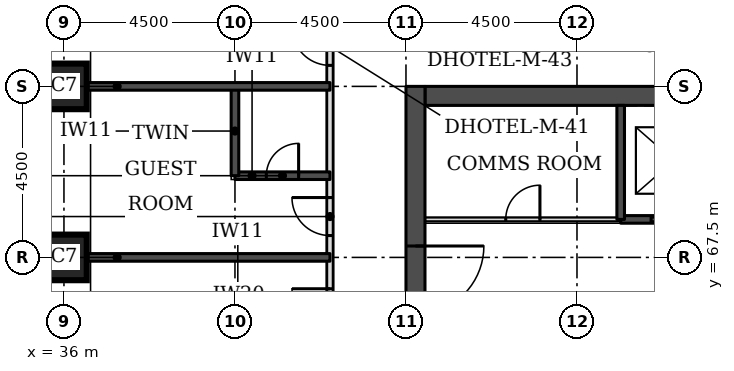
"""IFC4 building model, lengths in metres.
Left out: names, types, materials, properties, quantities, classifications, styles, units other than length and angle.
Written with IfcOpenShell. Run it as: python <this file> out.ifc"""

import sys

from ifc_helpers import new_model, si_unit, direction, frame, frame_2d, origin, origin_2d, place, context, subcontext, project, spatial, rectangle, extrude, element, fill, save


model = new_model("IFC4")
c1 = context("Model", 3, precision=1e-05, world=origin(), true_north=direction((0.0, 1.0)))
c2 = subcontext(c1, "Body", "Model", "MODEL_VIEW")
j1 = project(units=[si_unit("LENGTHUNIT", "METRE"), si_unit("PLANEANGLEUNIT", "RADIAN")], contexts=[c1])
p1 = place(None, origin())
s1 = spatial("IfcSite", under=j1, at=p1, CompositionType="ELEMENT")
p2 = place(p1, origin())
s2 = spatial("IfcBuilding", under=s1, at=p2, CompositionType="ELEMENT")
p3 = place(p2, frame((0.0, 0.0, 23.1)))
s3 = spatial("IfcBuildingStorey", under=s2, at=p3, CompositionType="ELEMENT", Elevation=23.1)
for number, where, z_axis, x_axis in (
    (1, (36.0, 67.5, 0.0), (0.0, 0.0, 1.0), (1.0, 0.0, 0.0)),
    (2, (36.0, 72.0, 0.0), (0.0, 0.0, 1.0), (1.0, 0.0, 0.0)),
):
    element("IfcColumn", number, at=place(p3, frame(where, z_axis=z_axis, x_axis=x_axis)), inside=s3, PredefinedType="COLUMN", context=c2, shape_type="SweptSolid", body=[
        extrude(rectangle(XDim=1.2, YDim=1.2, at=origin_2d()), origin(), (0.0, 0.0, 1.0), 3.3),
    ])
p4 = place(p3, frame((45.5, 71.75, 0.0), z_axis=(0.0, 0.0, 1.0), x_axis=(1.0, 0.0, 0.0)))
e3 = element("IfcWall", 3, at=p4, inside=s3, PredefinedType="SHEAR", context=c2, shape_type="SweptSolid", body=[
    extrude(rectangle(XDim=21.5, YDim=0.5, at=frame_2d((10.75, 0.0))), origin(), (0.0, 0.0, 1.0), 3.3),
])
p5 = place(p3, frame((45.25, 49.5, 0.0), z_axis=(0.0, 0.0, 1.0), x_axis=(0.0, 1.0, 0.0)))
e4 = element("IfcWall", 4, at=p5, inside=s3, PredefinedType="SHEAR", context=c2, shape_type="SweptSolid", body=[
    extrude(rectangle(XDim=22.5, YDim=0.5, at=frame_2d((11.25, 0.0))), origin(), (0.0, 0.0, 1.0), 3.3),
])
p6 = place(p5, frame((4.2, 0.0, 0.0)))
e5 = element("IfcOpeningElement", 5, at=p6, cuts=e4, PredefinedType="OPENING", context=c2, shape_type="SweptSolid", body=[
    extrude(rectangle(XDim=1.8, YDim=2.1, at=frame_2d((0.9, 1.05))), frame((0.0, 0.26, 0.0), z_axis=(0.0, -1.0, 0.0), x_axis=(1.0, 0.0, 0.0)), (0.0, 0.0, 1.0), 0.52),
])
p7 = place(p5, frame((6.9, 0.0, 0.0)))
e6 = element("IfcOpeningElement", 6, at=p7, cuts=e4, PredefinedType="OPENING", context=c2, shape_type="SweptSolid", body=[
    extrude(rectangle(XDim=1.1, YDim=2.1, at=frame_2d((0.55, 1.05))), frame((0.0, 0.26, 0.0), z_axis=(0.0, -1.0, 0.0), x_axis=(1.0, 0.0, 0.0)), (0.0, 0.0, 1.0), 0.52),
])
p8 = place(p5, frame((13.6, 0.0, 0.0)))
e7 = element("IfcOpeningElement", 7, at=p8, cuts=e4, PredefinedType="OPENING", context=c2, shape_type="SweptSolid", body=[
    extrude(rectangle(XDim=1.1, YDim=2.1, at=frame_2d((0.55, 1.05))), frame((0.0, 0.26, 0.0), z_axis=(0.0, -1.0, 0.0), x_axis=(1.0, 0.0, 0.0)), (0.0, 0.0, 1.0), 0.52),
])
p9 = place(p5, frame((16.5, 0.0, 0.0)))
e8 = element("IfcOpeningElement", 8, at=p9, cuts=e4, PredefinedType="OPENING", context=c2, shape_type="SweptSolid", body=[
    extrude(rectangle(XDim=1.8, YDim=2.1, at=frame_2d((0.9, 1.05))), frame((0.0, 0.26, 0.0), z_axis=(0.0, -1.0, 0.0), x_axis=(1.0, 0.0, 0.0)), (0.0, 0.0, 1.0), 0.52),
])
p10 = place(p3, frame((43.0, 56.6, 0.0), z_axis=(0.0, 0.0, 1.0), x_axis=(0.0, 1.0, 0.0)))
e9 = element("IfcWall", 9, at=p10, inside=s3, PredefinedType="PARTITIONING", context=c2, shape_type="SweptSolid", body=[
    extrude(rectangle(XDim=17.4, YDim=0.15, at=frame_2d((8.7, 0.0))), origin(), (0.0, 0.0, 1.0), 3.08),
])
p11 = place(p10, frame((9.075, 0.0, 0.0)))
e10 = element("IfcOpeningElement", 10, at=p11, cuts=e9, PredefinedType="OPENING", context=c2, shape_type="SweptSolid", body=[
    extrude(rectangle(XDim=1.0, YDim=2.1, at=frame_2d((0.5, 1.05))), frame((0.0, 0.085, 0.0), z_axis=(0.0, -1.0, 0.0), x_axis=(1.0, 0.0, 0.0)), (0.0, 0.0, 1.0), 0.17),
])
p12 = place(p10, frame((11.475, 0.0, 0.0)))
e11 = element("IfcOpeningElement", 11, at=p12, cuts=e9, PredefinedType="OPENING", context=c2, shape_type="SweptSolid", body=[
    extrude(rectangle(XDim=1.0, YDim=2.1, at=frame_2d((0.5, 1.05))), frame((0.0, 0.085, 0.0), z_axis=(0.0, -1.0, 0.0), x_axis=(1.0, 0.0, 0.0)), (0.0, 0.0, 1.0), 0.17),
])
p13 = place(p10, frame((15.953, 0.0, 0.0)))
e12 = element("IfcOpeningElement", 12, at=p13, cuts=e9, PredefinedType="OPENING", context=c2, shape_type="SweptSolid", body=[
    extrude(rectangle(XDim=1.0, YDim=2.1, at=frame_2d((0.5, 1.05))), frame((0.0, 0.085, 0.0), z_axis=(0.0, -1.0, 0.0), x_axis=(1.0, 0.0, 0.0)), (0.0, 0.0, 1.0), 0.17),
])
p14 = place(p3, frame((36.6, 67.5, 0.0), z_axis=(0.0, 0.0, 1.0), x_axis=(1.0, 0.0, 0.0)))
e13 = element("IfcWall", 13, at=p14, inside=s3, PredefinedType="SOLIDWALL", context=c2, shape_type="SweptSolid", body=[
    extrude(rectangle(XDim=6.4, YDim=0.2, at=frame_2d((3.2, 0.0))), origin(), (0.0, 0.0, 1.0), 3.08),
])
p15 = place(p3, frame((40.5, 69.65, 0.0), z_axis=(0.0, 0.0, 1.0), x_axis=(1.0, 0.0, 0.0)))
e14 = element("IfcWall", 14, at=p15, inside=s3, PredefinedType="SOLIDWALL", context=c2, shape_type="SweptSolid", body=[
    extrude(rectangle(XDim=2.5, YDim=0.2, at=frame_2d((1.25, 0.0))), origin(), (0.0, 0.0, 1.0), 3.08),
])
p16 = place(p15, frame((0.825, 0.0, 0.0)))
e15 = element("IfcOpeningElement", 15, at=p16, cuts=e14, PredefinedType="OPENING", context=c2, shape_type="SweptSolid", body=[
    extrude(rectangle(XDim=0.85, YDim=2.1, at=frame_2d((0.425, 1.05))), frame((0.0, 0.11, 0.0), z_axis=(0.0, -1.0, 0.0), x_axis=(1.0, 0.0, 0.0)), (0.0, 0.0, 1.0), 0.22),
])
p17 = place(p3, frame((40.5, 69.65, 0.0), z_axis=(0.0, 0.0, 1.0), x_axis=(0.0, 1.0, 0.0)))
e16 = element("IfcWall", 16, at=p17, inside=s3, PredefinedType="SOLIDWALL", context=c2, shape_type="SweptSolid", body=[
    extrude(rectangle(XDim=2.35, YDim=0.2, at=frame_2d((1.175, 0.0))), origin(), (0.0, 0.0, 1.0), 3.08),
])
p18 = place(p3, frame((36.6, 72.0, 0.0), z_axis=(0.0, 0.0, 1.0), x_axis=(1.0, 0.0, 0.0)))
e17 = element("IfcWall", 17, at=p18, inside=s3, PredefinedType="SOLIDWALL", context=c2, shape_type="SweptSolid", body=[
    extrude(rectangle(XDim=6.4, YDim=0.2, at=frame_2d((3.2, 0.0))), origin(), (0.0, 0.0, 1.0), 3.08),
])
p19 = place(p3, frame((45.5, 68.5, 0.0), z_axis=(0.0, 0.0, 1.0), x_axis=(1.0, 0.0, 0.0)))
e18 = element("IfcWall", 18, at=p19, inside=s3, PredefinedType="PARTITIONING", context=c2, shape_type="SweptSolid", body=[
    extrude(rectangle(XDim=5.15, YDim=0.1, at=frame_2d((2.575, 0.0))), origin(), (0.0, 0.0, 1.0), 3.08),
])
p20 = place(p19, frame((2.125, 0.0, 0.0)))
e19 = element("IfcOpeningElement", 19, at=p20, cuts=e18, PredefinedType="OPENING", context=c2, shape_type="SweptSolid", body=[
    extrude(rectangle(XDim=0.9, YDim=2.1, at=frame_2d((0.45, 1.05))), frame((0.0, 0.06, 0.0), z_axis=(0.0, -1.0, 0.0), x_axis=(1.0, 0.0, 0.0)), (0.0, 0.0, 1.0), 0.12),
])
p21 = place(p3, frame((50.65, 68.5, 0.0), z_axis=(0.0, 0.0, 1.0), x_axis=(1.0, 0.0, 0.0)))
e20 = element("IfcWall", 20, at=p21, inside=s3, PredefinedType="SOLIDWALL", context=c2, shape_type="SweptSolid", body=[
    extrude(rectangle(XDim=11.2, YDim=0.2, at=frame_2d((5.6, 0.0))), origin(), (0.0, 0.0, 1.0), 3.08),
])
p22 = place(p21, frame((0.8, 0.0, 0.0)))
e21 = element("IfcOpeningElement", 21, at=p22, cuts=e20, PredefinedType="OPENING", context=c2, shape_type="SweptSolid", body=[
    extrude(rectangle(XDim=1.2, YDim=2.1, at=frame_2d((0.6, 1.05))), frame((0.0, 0.11, 0.0), z_axis=(0.0, -1.0, 0.0), x_axis=(1.0, 0.0, 0.0)), (0.0, 0.0, 1.0), 0.22),
])
p23 = place(p21, frame((3.6, 0.0, 0.0)))
e22 = element("IfcOpeningElement", 22, at=p23, cuts=e20, PredefinedType="OPENING", context=c2, shape_type="SweptSolid", body=[
    extrude(rectangle(XDim=1.2, YDim=2.1, at=frame_2d((0.6, 1.05))), frame((0.0, 0.11, 0.0), z_axis=(0.0, -1.0, 0.0), x_axis=(1.0, 0.0, 0.0)), (0.0, 0.0, 1.0), 0.22),
])
p24 = place(p21, frame((6.4, 0.0, 0.0)))
e23 = element("IfcOpeningElement", 23, at=p24, cuts=e20, PredefinedType="OPENING", context=c2, shape_type="SweptSolid", body=[
    extrude(rectangle(XDim=1.2, YDim=2.1, at=frame_2d((0.6, 1.05))), frame((0.0, 0.11, 0.0), z_axis=(0.0, -1.0, 0.0), x_axis=(1.0, 0.0, 0.0)), (0.0, 0.0, 1.0), 0.22),
])
p25 = place(p21, frame((9.2, 0.0, 0.0)))
e24 = element("IfcOpeningElement", 24, at=p25, cuts=e20, PredefinedType="OPENING", context=c2, shape_type="SweptSolid", body=[
    extrude(rectangle(XDim=1.2, YDim=2.1, at=frame_2d((0.6, 1.05))), frame((0.0, 0.11, 0.0), z_axis=(0.0, -1.0, 0.0), x_axis=(1.0, 0.0, 0.0)), (0.0, 0.0, 1.0), 0.22),
])
p26 = place(p3, frame((50.65, 68.5, 0.0), z_axis=(0.0, 0.0, 1.0), x_axis=(0.0, 1.0, 0.0)))
e25 = element("IfcWall", 25, at=p26, inside=s3, PredefinedType="SOLIDWALL", context=c2, shape_type="SweptSolid", body=[
    extrude(rectangle(XDim=3.0, YDim=0.2, at=frame_2d((1.5, 0.0))), origin(), (0.0, 0.0, 1.0), 3.08),
])
p27 = place(p11, origin())
e26 = element("IfcDoor", 26, at=p27, inside=s3, OperationType="SINGLE_SWING_RIGHT", PredefinedType="DOOR", context=c2, shape_type="SweptSolid", body=[
    extrude(rectangle(XDim=1.0, YDim=2.1, at=frame_2d((0.5, 1.05))), frame((0.0, 0.025, 0.0), z_axis=(0.0, -1.0, 0.0), x_axis=(1.0, 0.0, 0.0)), (0.0, 0.0, 1.0), 0.05),
])
fill(e10, e26)
p28 = place(p12, origin())
e27 = element("IfcDoor", 27, at=p28, inside=s3, OperationType="SINGLE_SWING_RIGHT", PredefinedType="DOOR", context=c2, shape_type="SweptSolid", body=[
    extrude(rectangle(XDim=1.0, YDim=2.1, at=frame_2d((0.5, 1.05))), frame((0.0, 0.025, 0.0), z_axis=(0.0, -1.0, 0.0), x_axis=(1.0, 0.0, 0.0)), (0.0, 0.0, 1.0), 0.05),
])
fill(e11, e27)
p29 = place(p16, origin())
e28 = element("IfcDoor", 28, at=p29, inside=s3, OperationType="SINGLE_SWING_RIGHT", PredefinedType="DOOR", context=c2, shape_type="SweptSolid", body=[
    extrude(rectangle(XDim=0.85, YDim=2.1, at=frame_2d((0.425, 1.05))), frame((0.0, 0.025, 0.0), z_axis=(0.0, -1.0, 0.0), x_axis=(1.0, 0.0, 0.0)), (0.0, 0.0, 1.0), 0.05),
])
fill(e15, e28)
p30 = place(p13, origin())
e29 = element("IfcDoor", 29, at=p30, inside=s3, OperationType="SINGLE_SWING_RIGHT", PredefinedType="DOOR", context=c2, shape_type="SweptSolid", body=[
    extrude(rectangle(XDim=1.0, YDim=2.1, at=frame_2d((0.5, 1.05))), frame((0.0, 0.025, 0.0), z_axis=(0.0, -1.0, 0.0), x_axis=(1.0, 0.0, 0.0)), (0.0, 0.0, 1.0), 0.05),
])
fill(e12, e29)
p31 = place(p22, origin())
e30 = element("IfcDoor", 30, at=p31, inside=s3, OperationType="DOUBLE_DOOR_SLIDING", PredefinedType="DOOR", context=c2, shape_type="SweptSolid", body=[
    extrude(rectangle(XDim=1.2, YDim=2.1, at=frame_2d((0.6, 1.05))), frame((0.0, 0.025, 0.0), z_axis=(0.0, -1.0, 0.0), x_axis=(1.0, 0.0, 0.0)), (0.0, 0.0, 1.0), 0.05),
])
fill(e21, e30)
p32 = place(p9, frame((1.8, 0.0, 0.0), z_axis=(0.0, 0.0, 1.0), x_axis=(-1.0, 0.0, 0.0)))
e31 = element("IfcDoor", 31, at=p32, inside=s3, OperationType="SINGLE_SWING_LEFT", PredefinedType="DOOR", context=c2, shape_type="SweptSolid", body=[
    extrude(rectangle(XDim=1.8, YDim=2.1, at=frame_2d((0.9, 1.05))), frame((0.0, 0.025, 0.0), z_axis=(0.0, -1.0, 0.0), x_axis=(1.0, 0.0, 0.0)), (0.0, 0.0, 1.0), 0.05),
])
fill(e8, e31)
p33 = place(p20, origin())
e32 = element("IfcDoor", 32, at=p33, inside=s3, OperationType="SINGLE_SWING_RIGHT", PredefinedType="DOOR", context=c2, shape_type="SweptSolid", body=[
    extrude(rectangle(XDim=0.9, YDim=2.1, at=frame_2d((0.45, 1.05))), frame((0.0, 0.025, 0.0), z_axis=(0.0, -1.0, 0.0), x_axis=(1.0, 0.0, 0.0)), (0.0, 0.0, 1.0), 0.05),
])
fill(e19, e32)
save(model, sys.argv[1])
